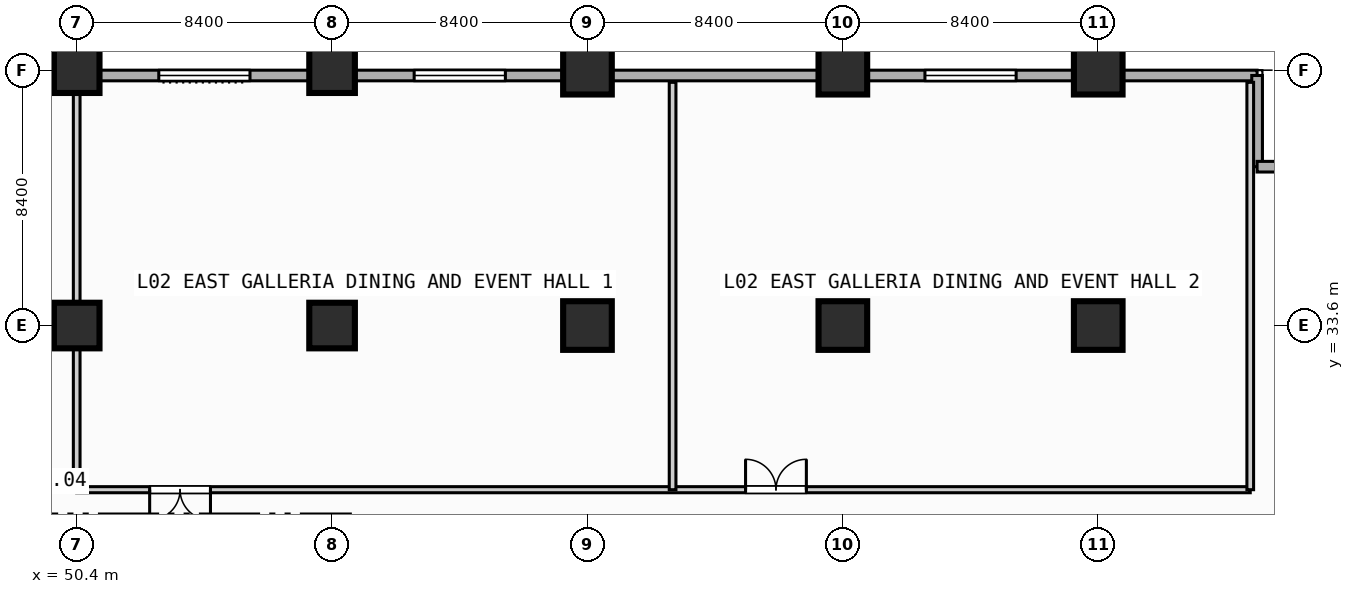
"""IFC4 building model, lengths in metres.
Left out: names, types, materials, properties, quantities, classifications, styles, units other than length and angle.
Written with IfcOpenShell. Run it as: python <this file> out.ifc"""

import sys

from ifc_helpers import new_model, si_unit, direction, frame, frame_2d, origin, origin_2d, place, context, subcontext, project, spatial, rectangle, extrude, element, fill, save


model = new_model("IFC4")
c1 = context("Model", 3, precision=1e-05, world=origin(), true_north=direction((0.0, 1.0)))
c2 = subcontext(c1, "Body", "Model", "MODEL_VIEW")
j1 = project(units=[si_unit("LENGTHUNIT", "METRE"), si_unit("PLANEANGLEUNIT", "RADIAN")], contexts=[c1])
p1 = place(None, origin())
s1 = spatial("IfcSite", under=j1, at=p1, CompositionType="ELEMENT")
p2 = place(p1, origin())
s2 = spatial("IfcBuilding", under=s1, at=p2, CompositionType="ELEMENT")
p3 = place(p2, frame((0.0, 0.0, 10.8)))
s3 = spatial("IfcBuildingStorey", under=s2, at=p3, CompositionType="ELEMENT", Elevation=10.8)
for number, where, z_axis, x_axis in (
    (1, (50.4, 33.6, 0.0), (0.0, 0.0, 1.0), (1.0, 0.0, 0.0)),
    (2, (50.4, 42.0, 0.0), (0.0, 0.0, 1.0), (1.0, 0.0, 0.0)),
    (3, (58.8, 33.6, 0.0), (0.0, 0.0, 1.0), (1.0, 0.0, 0.0)),
    (4, (58.8, 42.0, 0.0), (0.0, 0.0, 1.0), (1.0, 0.0, 0.0)),
):
    element("IfcColumn", number, at=place(p3, frame(where, z_axis=z_axis, x_axis=x_axis)), inside=s3, PredefinedType="COLUMN", context=c2, shape_type="SweptSolid", body=[
        extrude(rectangle(XDim=1.5, YDim=1.5, at=origin_2d()), origin(), (0.0, 0.0, 1.0), 4.8),
    ])
for number, where, z_axis, x_axis in (
    (5, (67.2, 33.6, 0.0), (0.0, 0.0, 1.0), (1.0, 0.0, 0.0)),
    (6, (67.2, 42.0, 0.0), (0.0, 0.0, 1.0), (1.0, 0.0, 0.0)),
    (7, (75.6, 33.6, 0.0), (0.0, 0.0, 1.0), (1.0, 0.0, 0.0)),
    (8, (75.6, 42.0, 0.0), (0.0, 0.0, 1.0), (1.0, 0.0, 0.0)),
    (9, (84.0, 33.6, 0.0), (0.0, 0.0, 1.0), (1.0, 0.0, 0.0)),
    (10, (84.0, 42.0, 0.0), (0.0, 0.0, 1.0), (1.0, 0.0, 0.0)),
):
    element("IfcColumn", number, at=place(p3, frame(where, z_axis=z_axis, x_axis=x_axis)), inside=s3, PredefinedType="COLUMN", context=c2, shape_type="SweptSolid", body=[
        extrude(rectangle(XDim=1.6, YDim=1.6, at=origin_2d()), origin(), (0.0, 0.0, 1.0), 4.8),
    ])
p4 = place(p3, frame((41.825, 41.825, 0.0), z_axis=(0.0, 0.0, 1.0), x_axis=(1.0, 0.0, 0.0)))
e11 = element("IfcWall", 11, at=p4, inside=s3, PredefinedType="STANDARD", context=c2, shape_type="SweptSolid", body=[
    extrude(rectangle(XDim=47.4, YDim=0.35, at=frame_2d((23.7, 0.0))), origin(), (0.0, 0.0, 1.0), 4.45),
])
p5 = place(p4, frame((11.275, 0.0, 0.85)))
e12 = element("IfcOpeningElement", 12, at=p5, cuts=e11, PredefinedType="OPENING", context=c2, shape_type="SweptSolid", body=[
    extrude(rectangle(XDim=3.0, YDim=2.4, at=frame_2d((1.5, 1.2))), frame((0.0, 0.185, 0.0), z_axis=(0.0, -1.0, 0.0), x_axis=(1.0, 0.0, 0.0)), (0.0, 0.0, 1.0), 0.37),
])
p6 = place(p4, frame((19.675, 0.0, 0.85)))
e13 = element("IfcOpeningElement", 13, at=p6, cuts=e11, PredefinedType="OPENING", context=c2, shape_type="SweptSolid", body=[
    extrude(rectangle(XDim=3.0, YDim=2.4, at=frame_2d((1.5, 1.2))), frame((0.0, 0.185, 0.0), z_axis=(0.0, -1.0, 0.0), x_axis=(1.0, 0.0, 0.0)), (0.0, 0.0, 1.0), 0.37),
])
p7 = place(p4, frame((36.475, 0.0, 0.85)))
e14 = element("IfcOpeningElement", 14, at=p7, cuts=e11, PredefinedType="OPENING", context=c2, shape_type="SweptSolid", body=[
    extrude(rectangle(XDim=3.0, YDim=2.4, at=frame_2d((1.5, 1.2))), frame((0.0, 0.185, 0.0), z_axis=(0.0, -1.0, 0.0), x_axis=(1.0, 0.0, 0.0)), (0.0, 0.0, 1.0), 0.37),
])
for number, where, z_axis, x_axis in (
    (15, (89.225, 41.825, 0.0), (0.0, 0.0, 1.0), (0.0, -1.0, 0.0)),
    (16, (89.225, 38.825, 0.0), (0.0, 0.0, 1.0), (1.0, 0.0, 0.0)),
):
    element("IfcWall", number, at=place(p3, frame(where, z_axis=z_axis, x_axis=x_axis)), inside=s3, PredefinedType="STANDARD", context=c2, shape_type="SweptSolid", body=[
        extrude(rectangle(XDim=3.0, YDim=0.35, at=frame_2d((1.5, 0.0))), origin(), (0.0, 0.0, 1.0), 4.45),
    ])
p8 = place(p3, frame((50.4, 28.2, 0.0), z_axis=(0.0, 0.0, 1.0), x_axis=(1.0, 0.0, 0.0)))
e17 = element("IfcWall", 17, at=p8, inside=s3, PredefinedType="PARTITIONING", context=c2, shape_type="SweptSolid", body=[
    extrude(rectangle(XDim=38.6, YDim=0.2, at=frame_2d((19.3, 0.0))), origin(), (0.0, 0.0, 1.0), 4.45),
])
p9 = place(p8, frame((2.4, 0.0, 0.0)))
e18 = element("IfcOpeningElement", 18, at=p9, cuts=e17, PredefinedType="OPENING", context=c2, shape_type="SweptSolid", body=[
    extrude(rectangle(XDim=2.0, YDim=2.15, at=frame_2d((1.0, 1.075))), frame((0.0, 0.11, 0.0), z_axis=(0.0, -1.0, 0.0), x_axis=(1.0, 0.0, 0.0)), (0.0, 0.0, 1.0), 0.22),
])
p10 = place(p8, frame((22.0, 0.0, 0.0)))
e19 = element("IfcOpeningElement", 19, at=p10, cuts=e17, PredefinedType="OPENING", context=c2, shape_type="SweptSolid", body=[
    extrude(rectangle(XDim=2.0, YDim=2.15, at=frame_2d((1.0, 1.075))), frame((0.0, 0.11, 0.0), z_axis=(0.0, -1.0, 0.0), x_axis=(1.0, 0.0, 0.0)), (0.0, 0.0, 1.0), 0.22),
])
p11 = place(p3, frame((50.4, 28.2, 0.0), z_axis=(0.0, 0.0, 1.0), x_axis=(0.0, 1.0, 0.0)))
e20 = element("IfcWall", 20, at=p11, inside=s3, PredefinedType="PARTITIONING", context=c2, shape_type="SweptSolid", body=[
    extrude(rectangle(XDim=13.4, YDim=0.22, at=frame_2d((6.7, 0.0))), origin(), (0.0, 0.0, 1.0), 3.6),
])
for number, where, z_axis, x_axis in (
    (21, (70.0, 28.2, 0.0), (0.0, 0.0, 1.0), (0.0, 1.0, 0.0)),
    (22, (89.0, 28.2, 0.0), (0.0, 0.0, 1.0), (0.0, 1.0, 0.0)),
):
    element("IfcWall", number, at=place(p3, frame(where, z_axis=z_axis, x_axis=x_axis)), inside=s3, PredefinedType="PARTITIONING", context=c2, shape_type="SweptSolid", body=[
        extrude(rectangle(XDim=13.4, YDim=0.22, at=frame_2d((6.7, 0.0))), origin(), (0.0, 0.0, 1.0), 4.45),
    ])
p12 = place(p5, origin())
e23 = element("IfcWindow", 23, at=p12, inside=s3, PartitioningType="SINGLE_PANEL", PredefinedType="WINDOW", context=c2, shape_type="SweptSolid", body=[
    extrude(rectangle(XDim=3.0, YDim=2.4, at=frame_2d((1.5, 1.2))), frame((0.0, 0.03, 0.0), z_axis=(0.0, -1.0, 0.0), x_axis=(1.0, 0.0, 0.0)), (0.0, 0.0, 1.0), 0.06),
])
fill(e12, e23)
p13 = place(p6, origin())
e24 = element("IfcWindow", 24, at=p13, inside=s3, PartitioningType="SINGLE_PANEL", PredefinedType="WINDOW", context=c2, shape_type="SweptSolid", body=[
    extrude(rectangle(XDim=3.0, YDim=2.4, at=frame_2d((1.5, 1.2))), frame((0.0, 0.03, 0.0), z_axis=(0.0, -1.0, 0.0), x_axis=(1.0, 0.0, 0.0)), (0.0, 0.0, 1.0), 0.06),
])
fill(e13, e24)
p14 = place(p7, origin())
e25 = element("IfcWindow", 25, at=p14, inside=s3, PartitioningType="SINGLE_PANEL", PredefinedType="WINDOW", context=c2, shape_type="SweptSolid", body=[
    extrude(rectangle(XDim=3.0, YDim=2.4, at=frame_2d((1.5, 1.2))), frame((0.0, 0.03, 0.0), z_axis=(0.0, -1.0, 0.0), x_axis=(1.0, 0.0, 0.0)), (0.0, 0.0, 1.0), 0.06),
])
fill(e14, e25)
p15 = place(p9, origin())
e26 = element("IfcDoor", 26, at=p15, inside=s3, OperationType="SINGLE_SWING_RIGHT", PredefinedType="DOOR", context=c2, shape_type="SweptSolid", body=[
    extrude(rectangle(XDim=2.0, YDim=2.15, at=frame_2d((1.0, 1.075))), frame((0.0, 0.025, 0.0), z_axis=(0.0, -1.0, 0.0), x_axis=(1.0, 0.0, 0.0)), (0.0, 0.0, 1.0), 0.05),
])
fill(e18, e26)
p16 = place(p10, origin())
e27 = element("IfcDoor", 27, at=p16, inside=s3, OperationType="SINGLE_SWING_LEFT", PredefinedType="DOOR", context=c2, shape_type="SweptSolid", body=[
    extrude(rectangle(XDim=2.0, YDim=2.15, at=frame_2d((1.0, 1.075))), frame((0.0, 0.025, 0.0), z_axis=(0.0, -1.0, 0.0), x_axis=(1.0, 0.0, 0.0)), (0.0, 0.0, 1.0), 0.05),
])
fill(e19, e27)
save(model, sys.argv[1])
